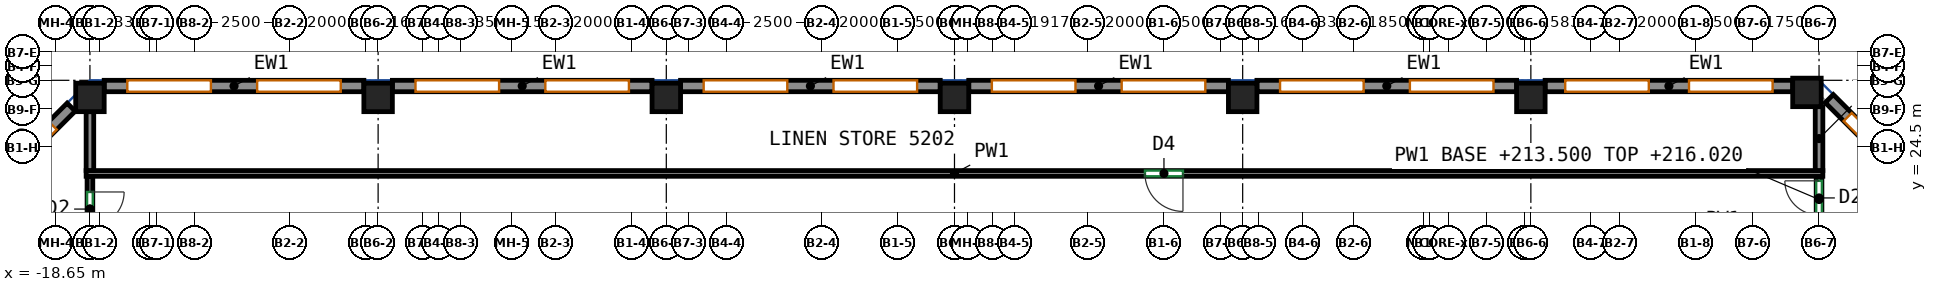
"""IFC4 building model, lengths in metres.
Left out: names, types, materials, properties, quantities, classifications, styles, units other than length and angle.
Written with IfcOpenShell. Run it as: python <this file> out.ifc"""

import sys

from ifc_helpers import new_model, si_unit, direction, frame, frame_2d, origin, origin_2d, place, context, subcontext, project, spatial, rectangle, extrude, source, transform, mapped, element, fill, save


model = new_model("IFC4")
c1 = context("Model", 3, precision=1e-05, world=origin(), true_north=direction((0.0, 1.0)))
c2 = subcontext(c1, "Body", "Model", "MODEL_VIEW")
j1 = project(units=[si_unit("LENGTHUNIT", "METRE"), si_unit("PLANEANGLEUNIT", "RADIAN")], contexts=[c1])
p1 = place(None, origin())
s1 = spatial("IfcSite", under=j1, at=p1, CompositionType="ELEMENT")
p2 = place(p1, origin())
s2 = spatial("IfcBuilding", under=s1, at=p2, CompositionType="ELEMENT")
p3 = place(p2, frame((0.0, 0.0, 213.5)))
s3 = spatial("IfcBuildingStorey", under=s2, at=p3, CompositionType="ELEMENT", Elevation=213.5)
m1 = source(origin(), c2, "Body", "SweptSolid", [
    extrude(rectangle(XDim=0.75, YDim=0.75, at=origin_2d()), origin(), (0.0, 0.0, 1.0), 3.12),
])
for number, where, z_axis, x_axis in (
    (1, (-17.75, 25.8, 0.0), (0.0, 0.0, 1.0), (1.0, 0.0, 0.0)),
    (2, (-10.167, 25.8, 0.0), (0.0, 0.0, 1.0), (1.0, 0.0, 0.0)),
    (3, (-2.583, 25.8, 0.0), (0.0, 0.0, 1.0), (1.0, 0.0, 0.0)),
    (4, (5.0, 25.8, 0.0), (0.0, 0.0, 1.0), (1.0, 0.0, 0.0)),
    (5, (12.583, 25.8, 0.0), (0.0, 0.0, 1.0), (1.0, 0.0, 0.0)),
    (6, (20.167, 25.8, 0.0), (0.0, 0.0, 1.0), (1.0, 0.0, 0.0)),
    (7, (27.432, 25.932, 0.0), (0.0, 0.0, 1.0), (1.0, 0.0, 0.0)),
):
    element("IfcColumn", number, at=place(p3, frame(where, z_axis=z_axis, x_axis=x_axis)), inside=s3, PredefinedType="COLUMN", context=c2, shape_type="MappedRepresentation", body=[
        mapped(m1, transform((0.0, 0.0, 0.0))),
    ])
m2 = source(origin(), c2, "Body", "SweptSolid", [
    extrude(rectangle(XDim=3.571, YDim=0.3, at=frame_2d((1.786, 0.0))), origin(), (0.0, 0.0, 1.0), 3.12),
])
p4 = place(p3, frame((30.544, 23.244, 0.0), z_axis=(0.0, 0.0, 1.0), x_axis=(-0.707140964879, 0.707072595841, 0.0)))
e8 = element("IfcWall", 8, at=p4, inside=s3, PredefinedType="SOLIDWALL", context=c2, shape_type="MappedRepresentation", body=[
    mapped(m2, transform((0.0, 0.0, 0.0))),
])
p5 = place(p4, frame((0.686, 0.0, 0.85)))
e9 = element("IfcOpeningElement", 9, at=p5, cuts=e8, PredefinedType="OPENING", context=c2, shape_type="SweptSolid", body=[
    extrude(rectangle(XDim=2.2, YDim=1.95, at=frame_2d((1.1, 0.975))), frame((0.0, 0.16, 0.0), z_axis=(0.0, -1.0, 0.0), x_axis=(1.0, 0.0, 0.0)), (0.0, 0.0, 1.0), 0.32),
])
m3 = source(origin(), c2, "Body", "SweptSolid", [
    extrude(rectangle(XDim=6.515, YDim=0.3, at=frame_2d((3.258, 0.0))), origin(), (0.0, 0.0, 1.0), 3.12),
])
p6 = place(p3, frame((27.057, 26.1, 0.0), z_axis=(0.0, 0.0, 1.0), x_axis=(-1.0, 0.0, 0.0)))
e10 = element("IfcWall", 10, at=p6, inside=s3, PredefinedType="SOLIDWALL", context=c2, shape_type="MappedRepresentation", body=[
    mapped(m3, transform((0.0, 0.0, 0.0))),
])
p7 = place(p6, frame((0.529, 0.0, 0.85)))
e11 = element("IfcOpeningElement", 11, at=p7, cuts=e10, PredefinedType="OPENING", context=c2, shape_type="SweptSolid", body=[
    extrude(rectangle(XDim=2.2, YDim=1.95, at=frame_2d((1.1, 0.975))), frame((0.0, 0.16, 0.0), z_axis=(0.0, -1.0, 0.0), x_axis=(1.0, 0.0, 0.0)), (0.0, 0.0, 1.0), 0.32),
])
p8 = place(p6, frame((3.786, 0.0, 0.85)))
e12 = element("IfcOpeningElement", 12, at=p8, cuts=e10, PredefinedType="OPENING", context=c2, shape_type="SweptSolid", body=[
    extrude(rectangle(XDim=2.2, YDim=1.95, at=frame_2d((1.1, 0.975))), frame((0.0, 0.16, 0.0), z_axis=(0.0, -1.0, 0.0), x_axis=(1.0, 0.0, 0.0)), (0.0, 0.0, 1.0), 0.32),
])
m4 = source(origin(), c2, "Body", "SweptSolid", [
    extrude(rectangle(XDim=6.833, YDim=0.3, at=frame_2d((3.417, 0.0))), origin(), (0.0, 0.0, 1.0), 3.12),
])
p9 = place(p3, frame((19.792, 26.1, 0.0), z_axis=(0.0, 0.0, 1.0), x_axis=(-1.0, 0.0, 0.0)))
e13 = element("IfcWall", 13, at=p9, inside=s3, PredefinedType="SOLIDWALL", context=c2, shape_type="MappedRepresentation", body=[
    mapped(m4, transform((0.0, 0.0, 0.0))),
])
p10 = place(p9, frame((0.608, 0.0, 0.85)))
e14 = element("IfcOpeningElement", 14, at=p10, cuts=e13, PredefinedType="OPENING", context=c2, shape_type="SweptSolid", body=[
    extrude(rectangle(XDim=2.2, YDim=1.95, at=frame_2d((1.1, 0.975))), frame((0.0, 0.16, 0.0), z_axis=(0.0, -1.0, 0.0), x_axis=(1.0, 0.0, 0.0)), (0.0, 0.0, 1.0), 0.32),
])
p11 = place(p9, frame((4.025, 0.0, 0.85)))
e15 = element("IfcOpeningElement", 15, at=p11, cuts=e13, PredefinedType="OPENING", context=c2, shape_type="SweptSolid", body=[
    extrude(rectangle(XDim=2.2, YDim=1.95, at=frame_2d((1.1, 0.975))), frame((0.0, 0.16, 0.0), z_axis=(0.0, -1.0, 0.0), x_axis=(1.0, 0.0, 0.0)), (0.0, 0.0, 1.0), 0.32),
])
m5 = source(origin(), c2, "Body", "SweptSolid", [
    extrude(rectangle(XDim=6.833, YDim=0.3, at=frame_2d((3.417, 0.0))), origin(), (0.0, 0.0, 1.0), 3.12),
])
p12 = place(p3, frame((12.208, 26.1, 0.0), z_axis=(0.0, 0.0, 1.0), x_axis=(-1.0, 0.0, 0.0)))
e16 = element("IfcWall", 16, at=p12, inside=s3, PredefinedType="SOLIDWALL", context=c2, shape_type="MappedRepresentation", body=[
    mapped(m5, transform((0.0, 0.0, 0.0))),
])
p13 = place(p12, frame((0.608, 0.0, 0.85)))
e17 = element("IfcOpeningElement", 17, at=p13, cuts=e16, PredefinedType="OPENING", context=c2, shape_type="SweptSolid", body=[
    extrude(rectangle(XDim=2.2, YDim=1.95, at=frame_2d((1.1, 0.975))), frame((0.0, 0.16, 0.0), z_axis=(0.0, -1.0, 0.0), x_axis=(1.0, 0.0, 0.0)), (0.0, 0.0, 1.0), 0.32),
])
p14 = place(p12, frame((4.025, 0.0, 0.85)))
e18 = element("IfcOpeningElement", 18, at=p14, cuts=e16, PredefinedType="OPENING", context=c2, shape_type="SweptSolid", body=[
    extrude(rectangle(XDim=2.2, YDim=1.95, at=frame_2d((1.1, 0.975))), frame((0.0, 0.16, 0.0), z_axis=(0.0, -1.0, 0.0), x_axis=(1.0, 0.0, 0.0)), (0.0, 0.0, 1.0), 0.32),
])
p15 = place(p3, frame((4.625, 26.1, 0.0), z_axis=(0.0, 0.0, 1.0), x_axis=(-1.0, 0.0, 0.0)))
e19 = element("IfcWall", 19, at=p15, inside=s3, PredefinedType="SOLIDWALL", context=c2, shape_type="MappedRepresentation", body=[
    mapped(m5, transform((0.0, 0.0, 0.0))),
])
p16 = place(p15, frame((0.608, 0.0, 0.85)))
e20 = element("IfcOpeningElement", 20, at=p16, cuts=e19, PredefinedType="OPENING", context=c2, shape_type="SweptSolid", body=[
    extrude(rectangle(XDim=2.2, YDim=1.95, at=frame_2d((1.1, 0.975))), frame((0.0, 0.16, 0.0), z_axis=(0.0, -1.0, 0.0), x_axis=(1.0, 0.0, 0.0)), (0.0, 0.0, 1.0), 0.32),
])
p17 = place(p15, frame((4.025, 0.0, 0.85)))
e21 = element("IfcOpeningElement", 21, at=p17, cuts=e19, PredefinedType="OPENING", context=c2, shape_type="SweptSolid", body=[
    extrude(rectangle(XDim=2.2, YDim=1.95, at=frame_2d((1.1, 0.975))), frame((0.0, 0.16, 0.0), z_axis=(0.0, -1.0, 0.0), x_axis=(1.0, 0.0, 0.0)), (0.0, 0.0, 1.0), 0.32),
])
p18 = place(p3, frame((-2.958, 26.1, 0.0), z_axis=(0.0, 0.0, 1.0), x_axis=(-1.0, 0.0, 0.0)))
e22 = element("IfcWall", 22, at=p18, inside=s3, PredefinedType="SOLIDWALL", context=c2, shape_type="MappedRepresentation", body=[
    mapped(m4, transform((0.0, 0.0, 0.0))),
])
p19 = place(p18, frame((0.608, 0.0, 0.85)))
e23 = element("IfcOpeningElement", 23, at=p19, cuts=e22, PredefinedType="OPENING", context=c2, shape_type="SweptSolid", body=[
    extrude(rectangle(XDim=2.2, YDim=1.95, at=frame_2d((1.1, 0.975))), frame((0.0, 0.16, 0.0), z_axis=(0.0, -1.0, 0.0), x_axis=(1.0, 0.0, 0.0)), (0.0, 0.0, 1.0), 0.32),
])
p20 = place(p18, frame((4.025, 0.0, 0.85)))
e24 = element("IfcOpeningElement", 24, at=p20, cuts=e22, PredefinedType="OPENING", context=c2, shape_type="SweptSolid", body=[
    extrude(rectangle(XDim=2.2, YDim=1.95, at=frame_2d((1.1, 0.975))), frame((0.0, 0.16, 0.0), z_axis=(0.0, -1.0, 0.0), x_axis=(1.0, 0.0, 0.0)), (0.0, 0.0, 1.0), 0.32),
])
p21 = place(p3, frame((-10.542, 26.1, 0.0), z_axis=(0.0, 0.0, 1.0), x_axis=(-1.0, 0.0, 0.0)))
e25 = element("IfcWall", 25, at=p21, inside=s3, PredefinedType="SOLIDWALL", context=c2, shape_type="MappedRepresentation", body=[
    mapped(m5, transform((0.0, 0.0, 0.0))),
])
p22 = place(p21, frame((0.608, 0.0, 0.85)))
e26 = element("IfcOpeningElement", 26, at=p22, cuts=e25, PredefinedType="OPENING", context=c2, shape_type="SweptSolid", body=[
    extrude(rectangle(XDim=2.2, YDim=1.95, at=frame_2d((1.1, 0.975))), frame((0.0, 0.16, 0.0), z_axis=(0.0, -1.0, 0.0), x_axis=(1.0, 0.0, 0.0)), (0.0, 0.0, 1.0), 0.32),
])
p23 = place(p21, frame((4.025, 0.0, 0.85)))
e27 = element("IfcOpeningElement", 27, at=p23, cuts=e25, PredefinedType="OPENING", context=c2, shape_type="SweptSolid", body=[
    extrude(rectangle(XDim=2.2, YDim=1.95, at=frame_2d((1.1, 0.975))), frame((0.0, 0.16, 0.0), z_axis=(0.0, -1.0, 0.0), x_axis=(1.0, 0.0, 0.0)), (0.0, 0.0, 1.0), 0.32),
])
p24 = place(p3, frame((-18.244, 25.544, 0.0), z_axis=(0.0, 0.0, 1.0), x_axis=(-0.707072595841, -0.707140964879, 0.0)))
e28 = element("IfcWall", 28, at=p24, inside=s3, PredefinedType="SOLIDWALL", context=c2, shape_type="MappedRepresentation", body=[
    mapped(m2, transform((0.0, 0.0, 0.0))),
])
p25 = place(p24, frame((0.686, 0.0, 0.85)))
e29 = element("IfcOpeningElement", 29, at=p25, cuts=e28, PredefinedType="OPENING", context=c2, shape_type="SweptSolid", body=[
    extrude(rectangle(XDim=2.2, YDim=1.95, at=frame_2d((1.1, 0.975))), frame((0.0, 0.16, 0.0), z_axis=(0.0, -1.0, 0.0), x_axis=(1.0, 0.0, 0.0)), (0.0, 0.0, 1.0), 0.32),
])
p26 = place(p3, frame((-17.75, 23.725, 0.0), z_axis=(0.0, 0.0, 1.0), x_axis=(0.0, -1.0, 0.0)))
e30 = element("IfcWall", 30, at=p26, inside=s3, PredefinedType="PARTITIONING", context=c2, shape_type="SweptSolid", body=[
    extrude(rectangle(XDim=1.725, YDim=0.15, at=frame_2d((0.863, 0.0))), origin(), (0.0, 0.0, 1.0), 3.12),
])
p27 = place(p26, frame((0.413, 0.0, 0.0)))
e31 = element("IfcOpeningElement", 31, at=p27, cuts=e30, PredefinedType="OPENING", context=c2, shape_type="SweptSolid", body=[
    extrude(rectangle(XDim=0.9, YDim=2.1, at=frame_2d((0.45, 1.05))), frame((0.0, 0.085, 0.0), z_axis=(0.0, -1.0, 0.0), x_axis=(1.0, 0.0, 0.0)), (0.0, 0.0, 1.0), 0.17),
])
p28 = place(p3, frame((27.75, 22.503, 0.0), z_axis=(0.0, 0.0, 1.0), x_axis=(0.0, 1.0, 0.0)))
e32 = element("IfcWall", 32, at=p28, inside=s3, PredefinedType="PARTITIONING", context=c2, shape_type="SweptSolid", body=[
    extrude(rectangle(XDim=1.222, YDim=0.15, at=frame_2d((0.611, 0.0))), origin(), (0.0, 0.0, 1.0), 2.52),
])
p29 = place(p28, frame((0.202, 0.0, 0.0)))
e33 = element("IfcOpeningElement", 33, at=p29, cuts=e32, PredefinedType="OPENING", context=c2, shape_type="SweptSolid", body=[
    extrude(rectangle(XDim=0.9, YDim=2.1, at=frame_2d((0.45, 1.05))), frame((0.0, 0.085, 0.0), z_axis=(0.0, -1.0, 0.0), x_axis=(1.0, 0.0, 0.0)), (0.0, 0.0, 1.0), 0.17),
])
p30 = place(p3, frame((27.85, 23.8, 0.0), z_axis=(0.0, 0.0, 1.0), x_axis=(-1.0, 0.0, 0.0)))
e34 = element("IfcWall", 34, at=p30, inside=s3, PredefinedType="PARTITIONING", context=c2, shape_type="SweptSolid", body=[
    extrude(rectangle(XDim=45.7, YDim=0.15, at=frame_2d((22.85, 0.0))), origin(), (0.0, 0.0, 1.0), 3.12),
])
p31 = place(p30, frame((16.838, 0.0, 0.0)))
e35 = element("IfcOpeningElement", 35, at=p31, cuts=e34, PredefinedType="OPENING", context=c2, shape_type="SweptSolid", body=[
    extrude(rectangle(XDim=1.0, YDim=2.1, at=frame_2d((0.5, 1.05))), frame((0.0, 0.085, 0.0), z_axis=(0.0, -1.0, 0.0), x_axis=(1.0, 0.0, 0.0)), (0.0, 0.0, 1.0), 0.17),
])
p32 = place(p3, frame((-17.75, 23.877, 0.0), z_axis=(0.0, 0.0, 1.0), x_axis=(0.0, 1.0, 0.0)))
e36 = element("IfcWall", 36, at=p32, inside=s3, PredefinedType="PARTITIONING", context=c2, shape_type="SweptSolid", body=[
    extrude(rectangle(XDim=1.548, YDim=0.2, at=frame_2d((0.774, 0.0))), origin(), (0.0, 0.0, 1.0), 3.12),
])
p33 = place(p3, frame((27.75, 25.557, 0.0), z_axis=(0.0, 0.0, 1.0), x_axis=(0.0, -1.0, 0.0)))
e37 = element("IfcWall", 37, at=p33, inside=s3, PredefinedType="PARTITIONING", context=c2, shape_type="SweptSolid", body=[
    extrude(rectangle(XDim=1.68, YDim=0.2, at=frame_2d((0.84, 0.0))), origin(), (0.0, 0.0, 1.0), 2.52),
])
p34 = place(p5, origin())
e38 = element("IfcWindow", 38, at=p34, inside=s3, PartitioningType="SINGLE_PANEL", PredefinedType="WINDOW", context=c2, shape_type="SweptSolid", body=[
    extrude(rectangle(XDim=2.2, YDim=1.95, at=frame_2d((1.1, 0.975))), frame((0.0, 0.03, 0.0), z_axis=(0.0, -1.0, 0.0), x_axis=(1.0, 0.0, 0.0)), (0.0, 0.0, 1.0), 0.06),
])
fill(e9, e38)
p35 = place(p7, origin())
e39 = element("IfcWindow", 39, at=p35, inside=s3, PartitioningType="SINGLE_PANEL", PredefinedType="WINDOW", context=c2, shape_type="SweptSolid", body=[
    extrude(rectangle(XDim=2.2, YDim=1.95, at=frame_2d((1.1, 0.975))), frame((0.0, 0.03, 0.0), z_axis=(0.0, -1.0, 0.0), x_axis=(1.0, 0.0, 0.0)), (0.0, 0.0, 1.0), 0.06),
])
fill(e11, e39)
p36 = place(p8, origin())
e40 = element("IfcWindow", 40, at=p36, inside=s3, PartitioningType="SINGLE_PANEL", PredefinedType="WINDOW", context=c2, shape_type="SweptSolid", body=[
    extrude(rectangle(XDim=2.2, YDim=1.95, at=frame_2d((1.1, 0.975))), frame((0.0, 0.03, 0.0), z_axis=(0.0, -1.0, 0.0), x_axis=(1.0, 0.0, 0.0)), (0.0, 0.0, 1.0), 0.06),
])
fill(e12, e40)
p37 = place(p10, origin())
e41 = element("IfcWindow", 41, at=p37, inside=s3, PartitioningType="SINGLE_PANEL", PredefinedType="WINDOW", context=c2, shape_type="SweptSolid", body=[
    extrude(rectangle(XDim=2.2, YDim=1.95, at=frame_2d((1.1, 0.975))), frame((0.0, 0.03, 0.0), z_axis=(0.0, -1.0, 0.0), x_axis=(1.0, 0.0, 0.0)), (0.0, 0.0, 1.0), 0.06),
])
fill(e14, e41)
p38 = place(p11, origin())
e42 = element("IfcWindow", 42, at=p38, inside=s3, PartitioningType="SINGLE_PANEL", PredefinedType="WINDOW", context=c2, shape_type="SweptSolid", body=[
    extrude(rectangle(XDim=2.2, YDim=1.95, at=frame_2d((1.1, 0.975))), frame((0.0, 0.03, 0.0), z_axis=(0.0, -1.0, 0.0), x_axis=(1.0, 0.0, 0.0)), (0.0, 0.0, 1.0), 0.06),
])
fill(e15, e42)
p39 = place(p13, origin())
e43 = element("IfcWindow", 43, at=p39, inside=s3, PartitioningType="SINGLE_PANEL", PredefinedType="WINDOW", context=c2, shape_type="SweptSolid", body=[
    extrude(rectangle(XDim=2.2, YDim=1.95, at=frame_2d((1.1, 0.975))), frame((0.0, 0.03, 0.0), z_axis=(0.0, -1.0, 0.0), x_axis=(1.0, 0.0, 0.0)), (0.0, 0.0, 1.0), 0.06),
])
fill(e17, e43)
p40 = place(p14, origin())
e44 = element("IfcWindow", 44, at=p40, inside=s3, PartitioningType="SINGLE_PANEL", PredefinedType="WINDOW", context=c2, shape_type="SweptSolid", body=[
    extrude(rectangle(XDim=2.2, YDim=1.95, at=frame_2d((1.1, 0.975))), frame((0.0, 0.03, 0.0), z_axis=(0.0, -1.0, 0.0), x_axis=(1.0, 0.0, 0.0)), (0.0, 0.0, 1.0), 0.06),
])
fill(e18, e44)
p41 = place(p16, origin())
e45 = element("IfcWindow", 45, at=p41, inside=s3, PartitioningType="SINGLE_PANEL", PredefinedType="WINDOW", context=c2, shape_type="SweptSolid", body=[
    extrude(rectangle(XDim=2.2, YDim=1.95, at=frame_2d((1.1, 0.975))), frame((0.0, 0.03, 0.0), z_axis=(0.0, -1.0, 0.0), x_axis=(1.0, 0.0, 0.0)), (0.0, 0.0, 1.0), 0.06),
])
fill(e20, e45)
p42 = place(p17, origin())
e46 = element("IfcWindow", 46, at=p42, inside=s3, PartitioningType="SINGLE_PANEL", PredefinedType="WINDOW", context=c2, shape_type="SweptSolid", body=[
    extrude(rectangle(XDim=2.2, YDim=1.95, at=frame_2d((1.1, 0.975))), frame((0.0, 0.03, 0.0), z_axis=(0.0, -1.0, 0.0), x_axis=(1.0, 0.0, 0.0)), (0.0, 0.0, 1.0), 0.06),
])
fill(e21, e46)
p43 = place(p19, origin())
e47 = element("IfcWindow", 47, at=p43, inside=s3, PartitioningType="SINGLE_PANEL", PredefinedType="WINDOW", context=c2, shape_type="SweptSolid", body=[
    extrude(rectangle(XDim=2.2, YDim=1.95, at=frame_2d((1.1, 0.975))), frame((0.0, 0.03, 0.0), z_axis=(0.0, -1.0, 0.0), x_axis=(1.0, 0.0, 0.0)), (0.0, 0.0, 1.0), 0.06),
])
fill(e23, e47)
p44 = place(p20, origin())
e48 = element("IfcWindow", 48, at=p44, inside=s3, PartitioningType="SINGLE_PANEL", PredefinedType="WINDOW", context=c2, shape_type="SweptSolid", body=[
    extrude(rectangle(XDim=2.2, YDim=1.95, at=frame_2d((1.1, 0.975))), frame((0.0, 0.03, 0.0), z_axis=(0.0, -1.0, 0.0), x_axis=(1.0, 0.0, 0.0)), (0.0, 0.0, 1.0), 0.06),
])
fill(e24, e48)
p45 = place(p22, origin())
e49 = element("IfcWindow", 49, at=p45, inside=s3, PartitioningType="SINGLE_PANEL", PredefinedType="WINDOW", context=c2, shape_type="SweptSolid", body=[
    extrude(rectangle(XDim=2.2, YDim=1.95, at=frame_2d((1.1, 0.975))), frame((0.0, 0.03, 0.0), z_axis=(0.0, -1.0, 0.0), x_axis=(1.0, 0.0, 0.0)), (0.0, 0.0, 1.0), 0.06),
])
fill(e26, e49)
p46 = place(p23, origin())
e50 = element("IfcWindow", 50, at=p46, inside=s3, PartitioningType="SINGLE_PANEL", PredefinedType="WINDOW", context=c2, shape_type="SweptSolid", body=[
    extrude(rectangle(XDim=2.2, YDim=1.95, at=frame_2d((1.1, 0.975))), frame((0.0, 0.03, 0.0), z_axis=(0.0, -1.0, 0.0), x_axis=(1.0, 0.0, 0.0)), (0.0, 0.0, 1.0), 0.06),
])
fill(e27, e50)
p47 = place(p25, origin())
e51 = element("IfcWindow", 51, at=p47, inside=s3, PartitioningType="SINGLE_PANEL", PredefinedType="WINDOW", context=c2, shape_type="SweptSolid", body=[
    extrude(rectangle(XDim=2.2, YDim=1.95, at=frame_2d((1.1, 0.975))), frame((0.0, 0.03, 0.0), z_axis=(0.0, -1.0, 0.0), x_axis=(1.0, 0.0, 0.0)), (0.0, 0.0, 1.0), 0.06),
])
fill(e29, e51)
p48 = place(p27, origin())
e52 = element("IfcDoor", 52, at=p48, inside=s3, OperationType="SINGLE_SWING_LEFT", PredefinedType="DOOR", context=c2, shape_type="SweptSolid", body=[
    extrude(rectangle(XDim=0.9, YDim=2.1, at=frame_2d((0.45, 1.05))), frame((0.0, 0.025, 0.0), z_axis=(0.0, -1.0, 0.0), x_axis=(1.0, 0.0, 0.0)), (0.0, 0.0, 1.0), 0.05),
])
fill(e31, e52)
p49 = place(p29, origin())
e53 = element("IfcDoor", 53, at=p49, inside=s3, OperationType="SINGLE_SWING_RIGHT", PredefinedType="DOOR", context=c2, shape_type="SweptSolid", body=[
    extrude(rectangle(XDim=0.9, YDim=2.1, at=frame_2d((0.45, 1.05))), frame((0.0, 0.025, 0.0), z_axis=(0.0, -1.0, 0.0), x_axis=(1.0, 0.0, 0.0)), (0.0, 0.0, 1.0), 0.05),
])
fill(e33, e53)
p50 = place(p31, origin())
e54 = element("IfcDoor", 54, at=p50, inside=s3, OperationType="SINGLE_SWING_LEFT", PredefinedType="DOOR", context=c2, shape_type="SweptSolid", body=[
    extrude(rectangle(XDim=1.0, YDim=2.1, at=frame_2d((0.5, 1.05))), frame((0.0, 0.025, 0.0), z_axis=(0.0, -1.0, 0.0), x_axis=(1.0, 0.0, 0.0)), (0.0, 0.0, 1.0), 0.05),
])
fill(e35, e54)
save(model, sys.argv[1])
